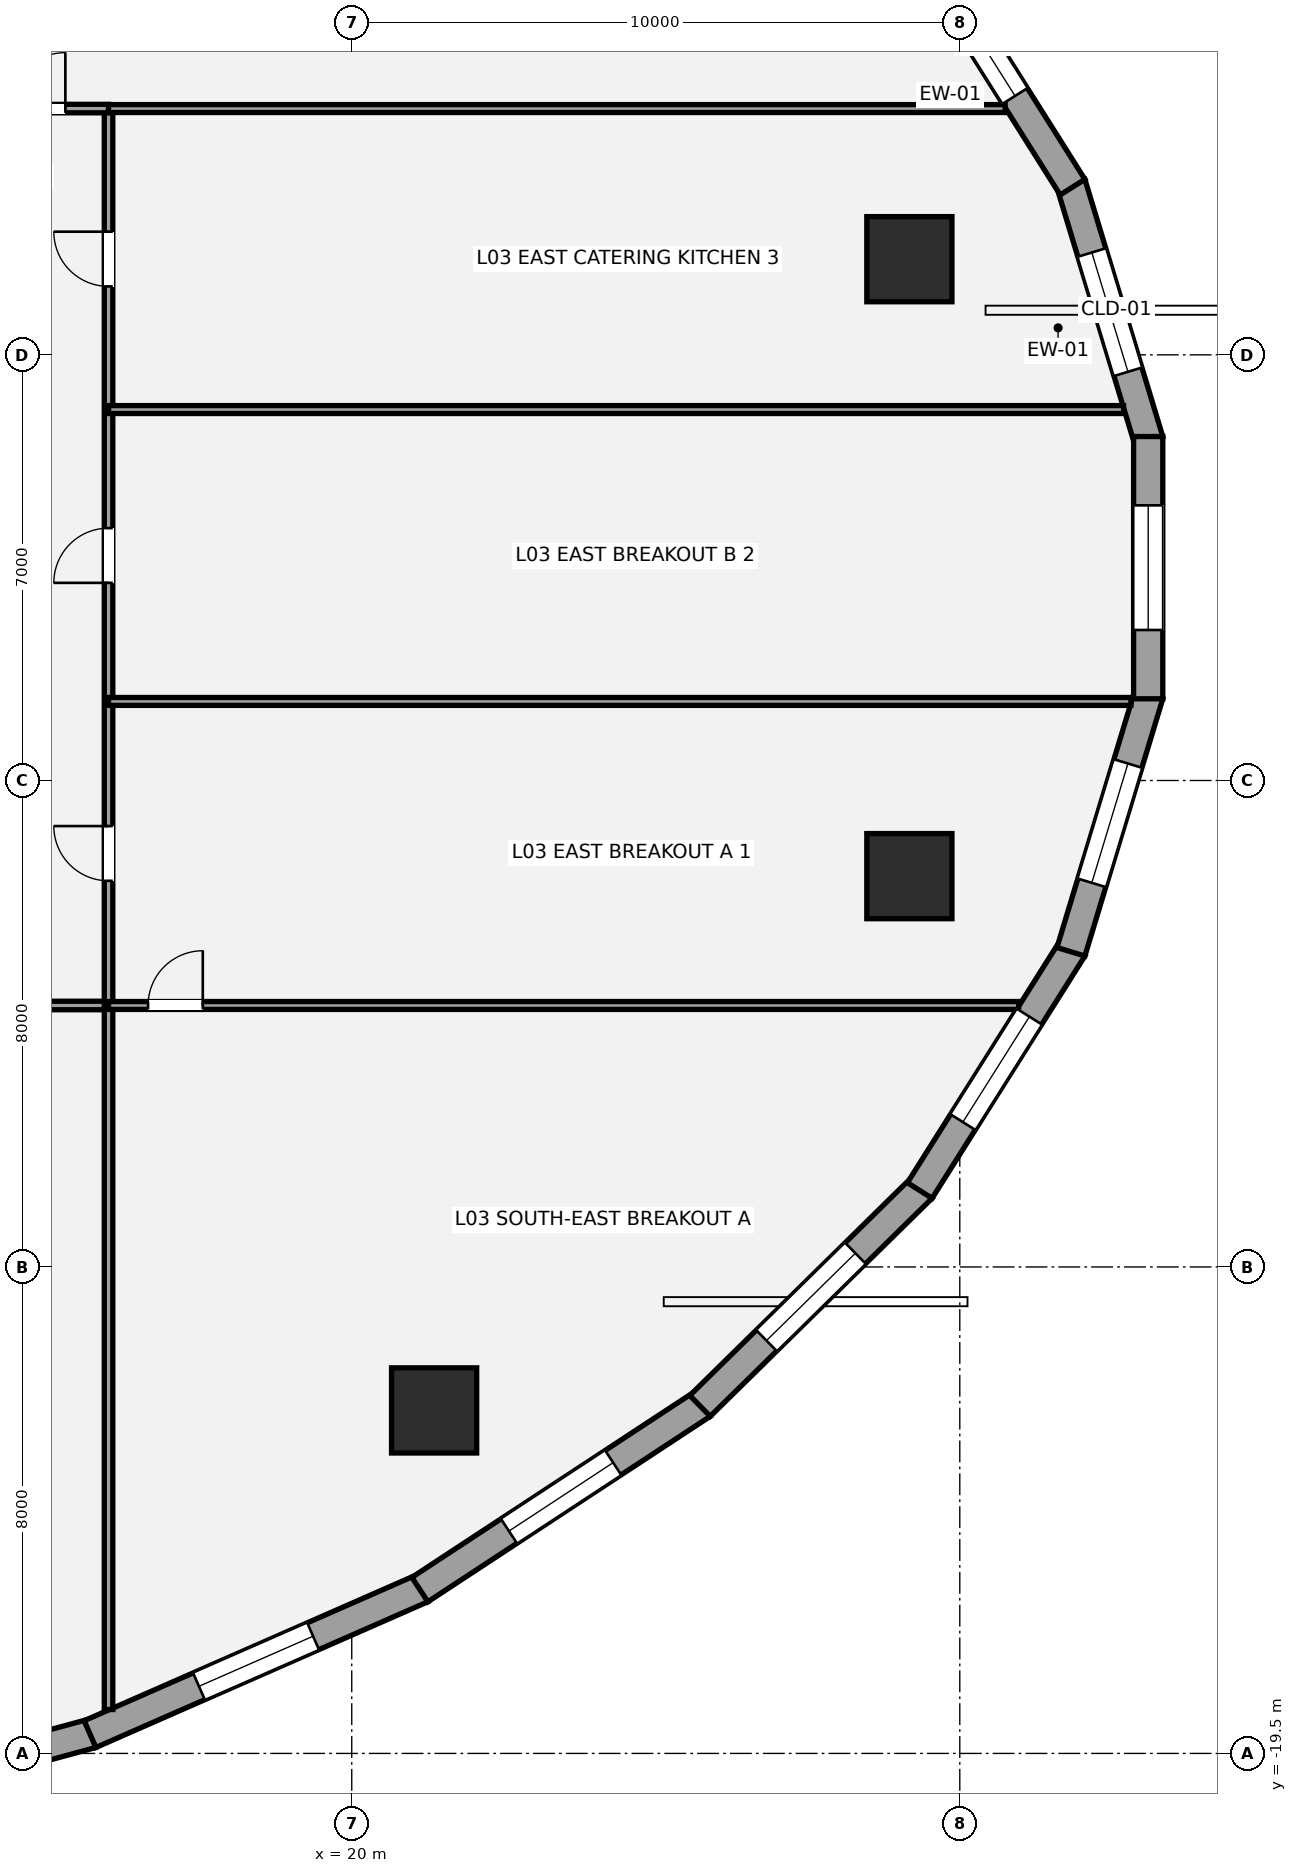
"""IFC4 building model, lengths in metres.
Left out: names, types, materials, properties, quantities, classifications, styles, units other than length and angle.
Written with IfcOpenShell. Run it as: python <this file> out.ifc"""

import sys

from ifc_helpers import new_model, si_unit, direction, frame, frame_2d, origin, origin_2d, place, context, subcontext, project, spatial, rectangle, hollow_circle, extrude, element, fill, save


model = new_model("IFC4")
c1 = context("Model", 3, precision=1e-05, world=origin(), true_north=direction((0.0, 1.0)))
c2 = subcontext(c1, "Body", "Model", "MODEL_VIEW")
j1 = project(units=[si_unit("LENGTHUNIT", "METRE"), si_unit("PLANEANGLEUNIT", "RADIAN")], contexts=[c1])
p1 = place(None, origin())
s1 = spatial("IfcSite", under=j1, at=p1, CompositionType="ELEMENT")
p2 = place(p1, origin())
s2 = spatial("IfcBuilding", under=s1, at=p2, CompositionType="ELEMENT")
p3 = place(p2, frame((0.0, 0.0, 14.4)))
s3 = spatial("IfcBuildingStorey", under=s2, at=p3, CompositionType="ELEMENT", Elevation=14.4)
for number, where, z_axis, x_axis in (
    (1, (29.171, 5.073, 0.0), (0.0, 0.0, 1.0), (1.0, 0.0, 0.0)),
    (2, (21.354, -13.859, 0.0), (0.0, 0.0, 1.0), (1.0, 0.0, 0.0)),
    (3, (29.171, -5.073, 0.0), (0.0, 0.0, 1.0), (1.0, 0.0, 0.0)),
):
    element("IfcColumn", number, at=place(p3, frame(where, z_axis=z_axis, x_axis=x_axis)), inside=s3, PredefinedType="USERDEFINED", context=c2, shape_type="SweptSolid", body=[
        extrude(hollow_circle(Radius=0.7, WallThickness=0.05, at=origin_2d()), origin(), (0.0, 0.0, 1.0), 4.2),
    ])
p4 = place(p3, frame((31.828, 6.317, 0.0), z_axis=(0.0, 0.0, 1.0), x_axis=(0.289855603468, -0.957070388811, 0.0)))
e4 = element("IfcWall", 4, at=p4, inside=s3, PredefinedType="STANDARD", context=c2, shape_type="SweptSolid", body=[
    extrude(rectangle(XDim=4.419, YDim=0.48, at=frame_2d((2.21, 0.0))), origin(), (0.0, 0.0, 1.0), 3.109),
])
p5 = place(p4, frame((1.185, 0.0, 0.72)))
e5 = element("IfcOpeningElement", 5, at=p5, cuts=e4, PredefinedType="OPENING", context=c2, shape_type="SweptSolid", body=[
    extrude(rectangle(XDim=2.05, YDim=1.8, at=frame_2d((1.025, 0.9))), frame((0.0, 0.25, 0.0), z_axis=(0.0, -1.0, 0.0), x_axis=(1.0, 0.0, 0.0)), (0.0, 0.0, 1.0), 0.5),
])
p6 = place(p3, frame((29.341, 10.243, 0.0), z_axis=(0.0, 0.0, 1.0), x_axis=(0.53349762721, -0.845801561693, 0.0)))
e6 = element("IfcWall", 6, at=p6, inside=s3, PredefinedType="STANDARD", context=c2, shape_type="SweptSolid", body=[
    extrude(rectangle(XDim=4.711, YDim=0.48, at=frame_2d((2.355, 0.0))), origin(), (0.0, 0.0, 1.0), 3.109),
])
p7 = place(p6, frame((0.888, 0.0, 0.72)))
e7 = element("IfcOpeningElement", 7, at=p7, cuts=e6, PredefinedType="OPENING", context=c2, shape_type="SweptSolid", body=[
    extrude(rectangle(XDim=2.05, YDim=1.8, at=frame_2d((1.025, 0.9))), frame((0.0, 0.25, 0.0), z_axis=(0.0, -1.0, 0.0), x_axis=(1.0, 0.0, 0.0)), (0.0, 0.0, 1.0), 0.5),
])
p8 = place(p3, frame((15.729, -19.171, 0.0), z_axis=(0.0, 0.0, 1.0), x_axis=(-0.964936550718, -0.262483243445, 0.0)))
e8 = element("IfcWall", 8, at=p8, inside=s3, PredefinedType="STANDARD", context=c2, shape_type="SweptSolid", body=[
    extrude(rectangle(XDim=6.288, YDim=0.48, at=frame_2d((3.144, 0.0))), origin(), (0.0, 0.0, 1.0), 3.109),
])
p9 = place(p8, frame((2.119, 0.0, 0.72)))
e9 = element("IfcOpeningElement", 9, at=p9, cuts=e8, PredefinedType="OPENING", context=c2, shape_type="SweptSolid", body=[
    extrude(rectangle(XDim=2.05, YDim=1.8, at=frame_2d((1.025, 0.9))), frame((0.0, 0.25, 0.0), z_axis=(0.0, -1.0, 0.0), x_axis=(1.0, 0.0, 0.0)), (0.0, 0.0, 1.0), 0.5),
])
p10 = place(p3, frame((21.156, -16.786, 0.0), z_axis=(0.0, 0.0, 1.0), x_axis=(-0.91570760638, -0.401845218484, 0.0)))
e10 = element("IfcWall", 10, at=p10, inside=s3, PredefinedType="STANDARD", context=c2, shape_type="SweptSolid", body=[
    extrude(rectangle(XDim=5.963, YDim=0.48, at=frame_2d((2.981, 0.0))), origin(), (0.0, 0.0, 1.0), 3.109),
])
p11 = place(p10, frame((1.957, 0.0, 0.72)))
e11 = element("IfcOpeningElement", 11, at=p11, cuts=e10, PredefinedType="OPENING", context=c2, shape_type="SweptSolid", body=[
    extrude(rectangle(XDim=2.05, YDim=1.8, at=frame_2d((1.025, 0.9))), frame((0.0, 0.25, 0.0), z_axis=(0.0, -1.0, 0.0), x_axis=(1.0, 0.0, 0.0)), (0.0, 0.0, 1.0), 0.5),
])
p12 = place(p3, frame((25.764, -13.756, 0.0), z_axis=(0.0, 0.0, 1.0), x_axis=(-0.835863918172, -0.548936708827, 0.0)))
e12 = element("IfcWall", 12, at=p12, inside=s3, PredefinedType="STANDARD", context=c2, shape_type="SweptSolid", body=[
    extrude(rectangle(XDim=5.555, YDim=0.48, at=frame_2d((2.778, 0.0))), origin(), (0.0, 0.0, 1.0), 3.109),
])
p13 = place(p12, frame((1.753, 0.0, 0.72)))
e13 = element("IfcOpeningElement", 13, at=p13, cuts=e12, PredefinedType="OPENING", context=c2, shape_type="SweptSolid", body=[
    extrude(rectangle(XDim=2.05, YDim=1.8, at=frame_2d((1.025, 0.9))), frame((0.0, 0.25, 0.0), z_axis=(0.0, -1.0, 0.0), x_axis=(1.0, 0.0, 0.0)), (0.0, 0.0, 1.0), 0.5),
])
p14 = place(p3, frame((29.376, -10.199, 0.0), z_axis=(0.0, 0.0, 1.0), x_axis=(-0.713189080178, -0.700971708355, 0.0)))
e14 = element("IfcWall", 14, at=p14, inside=s3, PredefinedType="STANDARD", context=c2, shape_type="SweptSolid", body=[
    extrude(rectangle(XDim=5.116, YDim=0.48, at=frame_2d((2.558, 0.0))), origin(), (0.0, 0.0, 1.0), 3.109),
])
p15 = place(p14, frame((1.533, 0.0, 0.72)))
e15 = element("IfcOpeningElement", 15, at=p15, cuts=e14, PredefinedType="OPENING", context=c2, shape_type="SweptSolid", body=[
    extrude(rectangle(XDim=2.05, YDim=1.8, at=frame_2d((1.025, 0.9))), frame((0.0, 0.25, 0.0), z_axis=(0.0, -1.0, 0.0), x_axis=(1.0, 0.0, 0.0)), (0.0, 0.0, 1.0), 0.5),
])
p16 = place(p3, frame((31.854, -6.258, 0.0), z_axis=(0.0, 0.0, 1.0), x_axis=(-0.53349762721, -0.845801561693, 0.0)))
e16 = element("IfcWall", 16, at=p16, inside=s3, PredefinedType="STANDARD", context=c2, shape_type="SweptSolid", body=[
    extrude(rectangle(XDim=4.711, YDim=0.48, at=frame_2d((2.355, 0.0))), origin(), (0.0, 0.0, 1.0), 3.109),
])
p17 = place(p16, frame((1.33, 0.0, 0.72)))
e17 = element("IfcOpeningElement", 17, at=p17, cuts=e16, PredefinedType="OPENING", context=c2, shape_type="SweptSolid", body=[
    extrude(rectangle(XDim=2.05, YDim=1.8, at=frame_2d((1.025, 0.9))), frame((0.0, 0.25, 0.0), z_axis=(0.0, -1.0, 0.0), x_axis=(1.0, 0.0, 0.0)), (0.0, 0.0, 1.0), 0.5),
])
p18 = place(p3, frame((33.109, -2.087, 0.0), z_axis=(0.0, 0.0, 1.0), x_axis=(-0.289855603468, -0.957070388811, 0.0)))
e18 = element("IfcWall", 18, at=p18, inside=s3, PredefinedType="STANDARD", context=c2, shape_type="SweptSolid", body=[
    extrude(rectangle(XDim=4.419, YDim=0.48, at=frame_2d((2.21, 0.0))), origin(), (0.0, 0.0, 1.0), 3.109),
])
p19 = place(p18, frame((1.185, 0.0, 0.72)))
e19 = element("IfcOpeningElement", 19, at=p19, cuts=e18, PredefinedType="OPENING", context=c2, shape_type="SweptSolid", body=[
    extrude(rectangle(XDim=2.05, YDim=1.8, at=frame_2d((1.025, 0.9))), frame((0.0, 0.25, 0.0), z_axis=(0.0, -1.0, 0.0), x_axis=(1.0, 0.0, 0.0)), (0.0, 0.0, 1.0), 0.5),
])
p20 = place(p3, frame((33.099, 2.156, 0.0), z_axis=(0.0, 0.0, 1.0), x_axis=(0.0, -1.0, 0.0)))
e20 = element("IfcWall", 20, at=p20, inside=s3, PredefinedType="STANDARD", context=c2, shape_type="SweptSolid", body=[
    extrude(rectangle(XDim=4.313, YDim=0.48, at=frame_2d((2.156, 0.0))), origin(), (0.0, 0.0, 1.0), 3.109),
])
p21 = place(p20, frame((1.131, 0.0, 0.72)))
e21 = element("IfcOpeningElement", 21, at=p21, cuts=e20, PredefinedType="OPENING", context=c2, shape_type="SweptSolid", body=[
    extrude(rectangle(XDim=2.05, YDim=1.8, at=frame_2d((1.025, 0.9))), frame((0.0, 0.25, 0.0), z_axis=(0.0, -1.0, 0.0), x_axis=(1.0, 0.0, 0.0)), (0.0, 0.0, 1.0), 0.5),
])
p22 = place(p3, frame((-18.6, -7.2, 0.0), z_axis=(0.0, 0.0, 1.0), x_axis=(1.0, 0.0, 0.0)))
e22 = element("IfcWall", 22, at=p22, inside=s3, PredefinedType="PARTITIONING", context=c2, shape_type="SweptSolid", body=[
    extrude(rectangle(XDim=34.6, YDim=0.14, at=frame_2d((17.3, 0.0))), origin(), (0.0, 0.0, 1.0), 3.98),
])
p23 = place(p22, frame((3.6, 0.0, 0.0)))
e23 = element("IfcOpeningElement", 23, at=p23, cuts=e22, PredefinedType="OPENING", context=c2, shape_type="SweptSolid", body=[
    extrude(rectangle(XDim=0.9, YDim=2.1, at=frame_2d((0.45, 1.05))), frame((0.0, 0.08, 0.0), z_axis=(0.0, -1.0, 0.0), x_axis=(1.0, 0.0, 0.0)), (0.0, 0.0, 1.0), 0.16),
])
p24 = place(p22, frame((12.15, 0.0, 0.0)))
e24 = element("IfcOpeningElement", 24, at=p24, cuts=e22, PredefinedType="OPENING", context=c2, shape_type="SweptSolid", body=[
    extrude(rectangle(XDim=0.9, YDim=2.1, at=frame_2d((0.45, 1.05))), frame((0.0, 0.08, 0.0), z_axis=(0.0, -1.0, 0.0), x_axis=(1.0, 0.0, 0.0)), (0.0, 0.0, 1.0), 0.16),
])
p25 = place(p22, frame((20.8, 0.0, 0.0)))
e25 = element("IfcOpeningElement", 25, at=p25, cuts=e22, PredefinedType="OPENING", context=c2, shape_type="SweptSolid", body=[
    extrude(rectangle(XDim=0.9, YDim=2.1, at=frame_2d((0.45, 1.05))), frame((0.0, 0.08, 0.0), z_axis=(0.0, -1.0, 0.0), x_axis=(1.0, 0.0, 0.0)), (0.0, 0.0, 1.0), 0.16),
])
p26 = place(p22, frame((29.55, 0.0, 0.0)))
e26 = element("IfcOpeningElement", 26, at=p26, cuts=e22, PredefinedType="OPENING", context=c2, shape_type="SweptSolid", body=[
    extrude(rectangle(XDim=0.9, YDim=2.1, at=frame_2d((0.45, 1.05))), frame((0.0, 0.08, 0.0), z_axis=(0.0, -1.0, 0.0), x_axis=(1.0, 0.0, 0.0)), (0.0, 0.0, 1.0), 0.16),
])
p27 = place(p3, frame((16.0, -18.778, 0.0), z_axis=(0.0, 0.0, 1.0), x_axis=(0.0, 1.0, 0.0)))
e27 = element("IfcWall", 27, at=p27, inside=s3, PredefinedType="PARTITIONING", context=c2, shape_type="SweptSolid", body=[
    extrude(rectangle(XDim=26.328, YDim=0.14, at=frame_2d((13.164, 0.0))), origin(), (0.0, 0.0, 1.0), 3.348),
])
p28 = place(p27, frame((13.628, 0.0, 0.0)))
e28 = element("IfcOpeningElement", 28, at=p28, cuts=e27, PredefinedType="OPENING", context=c2, shape_type="SweptSolid", body=[
    extrude(rectangle(XDim=0.9, YDim=2.1, at=frame_2d((0.45, 1.05))), frame((0.0, 0.08, 0.0), z_axis=(0.0, -1.0, 0.0), x_axis=(1.0, 0.0, 0.0)), (0.0, 0.0, 1.0), 0.16),
])
p29 = place(p27, frame((18.528, 0.0, 0.0)))
e29 = element("IfcOpeningElement", 29, at=p29, cuts=e27, PredefinedType="OPENING", context=c2, shape_type="SweptSolid", body=[
    extrude(rectangle(XDim=0.9, YDim=2.1, at=frame_2d((0.45, 1.05))), frame((0.0, 0.08, 0.0), z_axis=(0.0, -1.0, 0.0), x_axis=(1.0, 0.0, 0.0)), (0.0, 0.0, 1.0), 0.16),
])
p30 = place(p27, frame((23.403, 0.0, 0.0)))
e30 = element("IfcOpeningElement", 30, at=p30, cuts=e27, PredefinedType="OPENING", context=c2, shape_type="SweptSolid", body=[
    extrude(rectangle(XDim=0.9, YDim=2.1, at=frame_2d((0.45, 1.05))), frame((0.0, 0.08, 0.0), z_axis=(0.0, -1.0, 0.0), x_axis=(1.0, 0.0, 0.0)), (0.0, 0.0, 1.0), 0.16),
])
p31 = place(p3, frame((14.05, 7.55, 0.0), z_axis=(0.0, 0.0, 1.0), x_axis=(1.0, 0.0, 0.0)))
e31 = element("IfcWall", 31, at=p31, inside=s3, PredefinedType="PARTITIONING", context=c2, shape_type="SweptSolid", body=[
    extrude(rectangle(XDim=1.95, YDim=0.14, at=frame_2d((0.975, 0.0))), origin(), (0.0, 0.0, 1.0), 3.433),
])
p32 = place(p31, frame((0.32, 0.0, 0.0)))
e32 = element("IfcOpeningElement", 32, at=p32, cuts=e31, PredefinedType="OPENING", context=c2, shape_type="SweptSolid", body=[
    extrude(rectangle(XDim=0.92, YDim=2.15, at=frame_2d((0.46, 1.075))), frame((0.0, 0.08, 0.0), z_axis=(0.0, -1.0, 0.0), x_axis=(1.0, 0.0, 0.0)), (0.0, 0.0, 1.0), 0.16),
])
p33 = place(p3, frame((16.0, 7.55, 0.0), z_axis=(0.0, 0.0, 1.0), x_axis=(1.0, 0.0, 0.0)))
e33 = element("IfcWall", 33, at=p33, inside=s3, PredefinedType="PARTITIONING", context=c2, shape_type="SweptSolid", body=[
    extrude(rectangle(XDim=14.747, YDim=0.13, at=frame_2d((7.373, 0.0))), origin(), (0.0, 0.0, 1.0), 2.958),
])
p34 = place(p3, frame((16.0, -7.2, 0.0), z_axis=(0.0, 0.0, 1.0), x_axis=(1.0, 0.0, 0.0)))
e34 = element("IfcWall", 34, at=p34, inside=s3, PredefinedType="PARTITIONING", context=c2, shape_type="SweptSolid", body=[
    extrude(rectangle(XDim=14.967, YDim=0.13, at=frame_2d((7.484, 0.0))), origin(), (0.0, 0.0, 1.0), 2.958),
])
p35 = place(p34, frame((0.65, 0.0, 0.0)))
e35 = element("IfcOpeningElement", 35, at=p35, cuts=e34, PredefinedType="OPENING", context=c2, shape_type="SweptSolid", body=[
    extrude(rectangle(XDim=0.9, YDim=2.1, at=frame_2d((0.45, 1.05))), frame((0.0, 0.075, 0.0), z_axis=(0.0, -1.0, 0.0), x_axis=(1.0, 0.0, 0.0)), (0.0, 0.0, 1.0), 0.15),
])
p36 = place(p3, frame((16.0, -2.2, 0.0), z_axis=(0.0, 0.0, 1.0), x_axis=(1.0, 0.0, 0.0)))
e36 = element("IfcWall", 36, at=p36, inside=s3, PredefinedType="PARTITIONING", context=c2, shape_type="SweptSolid", body=[
    extrude(rectangle(XDim=16.816, YDim=0.13, at=frame_2d((8.408, 0.0))), origin(), (0.0, 0.0, 1.0), 3.348),
])
p37 = place(p3, frame((16.0, 2.6, 0.0), z_axis=(0.0, 0.0, 1.0), x_axis=(1.0, 0.0, 0.0)))
e37 = element("IfcWall", 37, at=p37, inside=s3, PredefinedType="PARTITIONING", context=c2, shape_type="SweptSolid", body=[
    extrude(rectangle(XDim=16.694, YDim=0.13, at=frame_2d((8.347, 0.0))), origin(), (0.0, 0.0, 1.0), 3.348),
])
p38 = place(p5, origin())
e38 = element("IfcWindow", 38, at=p38, inside=s3, PartitioningType="SINGLE_PANEL", PredefinedType="WINDOW", context=c2, shape_type="SweptSolid", body=[
    extrude(rectangle(XDim=2.05, YDim=1.8, at=frame_2d((1.025, 0.9))), frame((0.0, -0.01, 0.0), z_axis=(0.0, -1.0, 0.0), x_axis=(1.0, 0.0, 0.0)), (0.0, 0.0, 1.0), 0.06),
])
fill(e5, e38)
p39 = place(p7, origin())
e39 = element("IfcWindow", 39, at=p39, inside=s3, PartitioningType="SINGLE_PANEL", PredefinedType="WINDOW", context=c2, shape_type="SweptSolid", body=[
    extrude(rectangle(XDim=2.05, YDim=1.8, at=frame_2d((1.025, 0.9))), frame((0.0, -0.01, 0.0), z_axis=(0.0, -1.0, 0.0), x_axis=(1.0, 0.0, 0.0)), (0.0, 0.0, 1.0), 0.06),
])
fill(e7, e39)
p40 = place(p11, origin())
e40 = element("IfcWindow", 40, at=p40, inside=s3, PartitioningType="SINGLE_PANEL", PredefinedType="WINDOW", context=c2, shape_type="SweptSolid", body=[
    extrude(rectangle(XDim=2.05, YDim=1.8, at=frame_2d((1.025, 0.9))), frame((0.0, -0.01, 0.0), z_axis=(0.0, -1.0, 0.0), x_axis=(1.0, 0.0, 0.0)), (0.0, 0.0, 1.0), 0.06),
])
fill(e11, e40)
p41 = place(p13, origin())
e41 = element("IfcWindow", 41, at=p41, inside=s3, PartitioningType="SINGLE_PANEL", PredefinedType="WINDOW", context=c2, shape_type="SweptSolid", body=[
    extrude(rectangle(XDim=2.05, YDim=1.8, at=frame_2d((1.025, 0.9))), frame((0.0, -0.01, 0.0), z_axis=(0.0, -1.0, 0.0), x_axis=(1.0, 0.0, 0.0)), (0.0, 0.0, 1.0), 0.06),
])
fill(e13, e41)
p42 = place(p15, origin())
e42 = element("IfcWindow", 42, at=p42, inside=s3, PartitioningType="SINGLE_PANEL", PredefinedType="WINDOW", context=c2, shape_type="SweptSolid", body=[
    extrude(rectangle(XDim=2.05, YDim=1.8, at=frame_2d((1.025, 0.9))), frame((0.0, -0.01, 0.0), z_axis=(0.0, -1.0, 0.0), x_axis=(1.0, 0.0, 0.0)), (0.0, 0.0, 1.0), 0.06),
])
fill(e15, e42)
p43 = place(p17, origin())
e43 = element("IfcWindow", 43, at=p43, inside=s3, PartitioningType="SINGLE_PANEL", PredefinedType="WINDOW", context=c2, shape_type="SweptSolid", body=[
    extrude(rectangle(XDim=2.05, YDim=1.8, at=frame_2d((1.025, 0.9))), frame((0.0, -0.01, 0.0), z_axis=(0.0, -1.0, 0.0), x_axis=(1.0, 0.0, 0.0)), (0.0, 0.0, 1.0), 0.06),
])
fill(e17, e43)
p44 = place(p19, origin())
e44 = element("IfcWindow", 44, at=p44, inside=s3, PartitioningType="SINGLE_PANEL", PredefinedType="WINDOW", context=c2, shape_type="SweptSolid", body=[
    extrude(rectangle(XDim=2.05, YDim=1.8, at=frame_2d((1.025, 0.9))), frame((0.0, -0.01, 0.0), z_axis=(0.0, -1.0, 0.0), x_axis=(1.0, 0.0, 0.0)), (0.0, 0.0, 1.0), 0.06),
])
fill(e19, e44)
p45 = place(p21, origin())
e45 = element("IfcWindow", 45, at=p45, inside=s3, PartitioningType="SINGLE_PANEL", PredefinedType="WINDOW", context=c2, shape_type="SweptSolid", body=[
    extrude(rectangle(XDim=2.05, YDim=1.8, at=frame_2d((1.025, 0.9))), frame((0.0, -0.01, 0.0), z_axis=(0.0, -1.0, 0.0), x_axis=(1.0, 0.0, 0.0)), (0.0, 0.0, 1.0), 0.06),
])
fill(e21, e45)
p46 = place(p32, origin())
e46 = element("IfcDoor", 46, at=p46, inside=s3, OperationType="SINGLE_SWING_RIGHT", PredefinedType="DOOR", context=c2, shape_type="SweptSolid", body=[
    extrude(rectangle(XDim=0.92, YDim=2.15, at=frame_2d((0.46, 1.075))), frame((0.0, 0.025, 0.0), z_axis=(0.0, -1.0, 0.0), x_axis=(1.0, 0.0, 0.0)), (0.0, 0.0, 1.0), 0.05),
])
fill(e32, e46)
p47 = place(p35, origin())
e47 = element("IfcDoor", 47, at=p47, inside=s3, OperationType="SINGLE_SWING_RIGHT", PredefinedType="DOOR", context=c2, shape_type="SweptSolid", body=[
    extrude(rectangle(XDim=0.9, YDim=2.1, at=frame_2d((0.45, 1.05))), frame((0.0, 0.025, 0.0), z_axis=(0.0, -1.0, 0.0), x_axis=(1.0, 0.0, 0.0)), (0.0, 0.0, 1.0), 0.05),
])
fill(e35, e47)
p48 = place(p28, origin())
e48 = element("IfcDoor", 48, at=p48, inside=s3, OperationType="SINGLE_SWING_RIGHT", PredefinedType="DOOR", context=c2, shape_type="SweptSolid", body=[
    extrude(rectangle(XDim=0.9, YDim=2.1, at=frame_2d((0.45, 1.05))), frame((0.0, 0.025, 0.0), z_axis=(0.0, -1.0, 0.0), x_axis=(1.0, 0.0, 0.0)), (0.0, 0.0, 1.0), 0.05),
])
fill(e28, e48)
p49 = place(p29, origin())
e49 = element("IfcDoor", 49, at=p49, inside=s3, OperationType="SINGLE_SWING_LEFT", PredefinedType="DOOR", context=c2, shape_type="SweptSolid", body=[
    extrude(rectangle(XDim=0.9, YDim=2.1, at=frame_2d((0.45, 1.05))), frame((0.0, 0.025, 0.0), z_axis=(0.0, -1.0, 0.0), x_axis=(1.0, 0.0, 0.0)), (0.0, 0.0, 1.0), 0.05),
])
fill(e29, e49)
p50 = place(p30, origin())
e50 = element("IfcDoor", 50, at=p50, inside=s3, OperationType="SINGLE_SWING_RIGHT", PredefinedType="DOOR", context=c2, shape_type="SweptSolid", body=[
    extrude(rectangle(XDim=0.9, YDim=2.1, at=frame_2d((0.45, 1.05))), frame((0.0, 0.025, 0.0), z_axis=(0.0, -1.0, 0.0), x_axis=(1.0, 0.0, 0.0)), (0.0, 0.0, 1.0), 0.05),
])
fill(e30, e50)
save(model, sys.argv[1])
